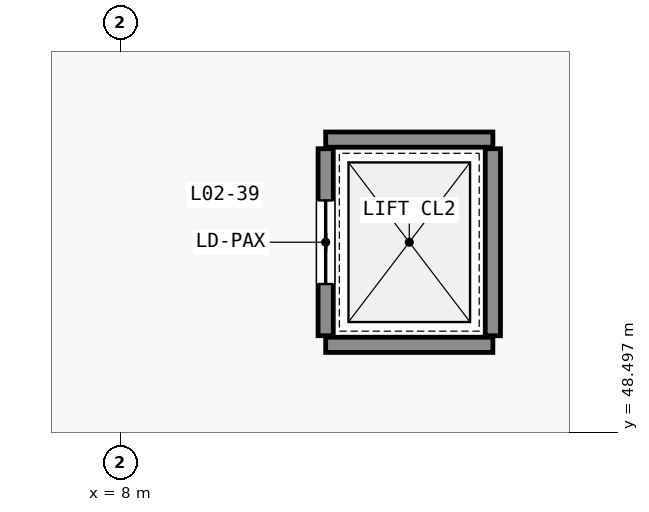
"""IFC4 building model, lengths in metres.
Left out: names, types, materials, properties, quantities, classifications, styles, units other than length and angle.
Written with IfcOpenShell. Run it as: python <this file> out.ifc"""

import sys

from ifc_helpers import new_model, si_unit, direction, frame, frame_2d, origin, place, context, subcontext, project, spatial, rectangle, extrude, element, fill, save


model = new_model("IFC4")
c1 = context("Model", 3, precision=1e-05, world=origin(), true_north=direction((0.0, 1.0)))
c2 = subcontext(c1, "Body", "Model", "MODEL_VIEW")
j1 = project(units=[si_unit("LENGTHUNIT", "METRE"), si_unit("PLANEANGLEUNIT", "RADIAN")], contexts=[c1])
p1 = place(None, origin())
s1 = spatial("IfcSite", under=j1, at=p1, CompositionType="ELEMENT")
p2 = place(p1, origin())
s2 = spatial("IfcBuilding", under=s1, at=p2, CompositionType="ELEMENT")
p3 = place(p2, frame((0.0, 0.0, 11.4)))
s3 = spatial("IfcBuildingStorey", under=s2, at=p3, CompositionType="ELEMENT", Elevation=11.4)
for number, where, z_axis, x_axis in (
    (1, (10.7, 49.65, 0.0), (0.0, 0.0, 1.0), (1.0, 0.0, 0.0)),
    (2, (10.7, 52.35, 0.0), (0.0, 0.0, 1.0), (1.0, 0.0, 0.0)),
):
    element("IfcWall", number, at=place(p3, frame(where, z_axis=z_axis, x_axis=x_axis)), inside=s3, PredefinedType="STANDARD", context=c2, shape_type="SweptSolid", body=[
        extrude(rectangle(XDim=2.2, YDim=0.2, at=frame_2d((1.1, 0.0))), origin(), (0.0, 0.0, 1.0), 4.45),
    ])
p4 = place(p3, frame((10.7, 49.77, 0.0), z_axis=(0.0, 0.0, 1.0), x_axis=(0.0, 1.0, 0.0)))
e3 = element("IfcWall", 3, at=p4, inside=s3, PredefinedType="STANDARD", context=c2, shape_type="SweptSolid", body=[
    extrude(rectangle(XDim=2.46, YDim=0.2, at=frame_2d((1.23, 0.0))), origin(), (0.0, 0.0, 1.0), 4.45),
])
p5 = place(p4, frame((0.68, 0.0, 0.0)))
e4 = element("IfcOpeningElement", 4, at=p5, cuts=e3, PredefinedType="OPENING", context=c2, shape_type="SweptSolid", body=[
    extrude(rectangle(XDim=1.1, YDim=2.15, at=frame_2d((0.55, 1.075))), frame((0.0, 0.11, 0.0), z_axis=(0.0, -1.0, 0.0), x_axis=(1.0, 0.0, 0.0)), (0.0, 0.0, 1.0), 0.22),
])
p6 = place(p3, frame((12.9, 49.77, 0.0), z_axis=(0.0, 0.0, 1.0), x_axis=(0.0, 1.0, 0.0)))
e5 = element("IfcWall", 5, at=p6, inside=s3, PredefinedType="STANDARD", context=c2, shape_type="SweptSolid", body=[
    extrude(rectangle(XDim=2.46, YDim=0.2, at=frame_2d((1.23, 0.0))), origin(), (0.0, 0.0, 1.0), 4.45),
])
p7 = place(p5, origin())
e6 = element("IfcDoor", 6, at=p7, inside=s3, OperationType="SLIDING_TO_LEFT", PredefinedType="DOOR", context=c2, shape_type="SweptSolid", body=[
    extrude(rectangle(XDim=1.1, YDim=2.15, at=frame_2d((0.55, 1.075))), frame((0.0, 0.025, 0.0), z_axis=(0.0, -1.0, 0.0), x_axis=(1.0, 0.0, 0.0)), (0.0, 0.0, 1.0), 0.05),
])
fill(e4, e6)
save(model, sys.argv[1])
